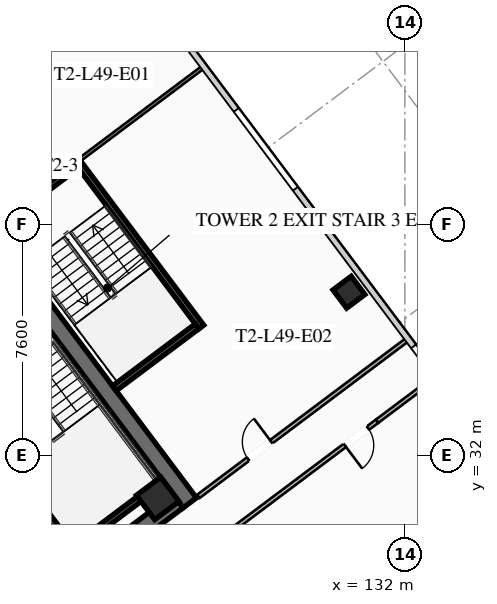
"""IFC4 building model, lengths in metres.
Left out: names, types, materials, properties, quantities, classifications, styles, units other than length and angle.
Written with IfcOpenShell. Run it as: python <this file> out.ifc"""

import sys

from ifc_helpers import new_model, si_unit, direction, frame, frame_2d, origin, origin_2d, place, context, subcontext, project, spatial, rectangle, hollow_rectangle, extrude, element, fill, save


model = new_model("IFC4")
c1 = context("Model", 3, precision=1e-05, world=origin(), true_north=direction((0.0, 1.0)))
c2 = subcontext(c1, "Body", "Model", "MODEL_VIEW")
j1 = project(units=[si_unit("LENGTHUNIT", "METRE"), si_unit("PLANEANGLEUNIT", "RADIAN")], contexts=[c1])
p1 = place(None, origin())
s1 = spatial("IfcSite", under=j1, at=p1, CompositionType="ELEMENT")
p2 = place(p1, origin())
s2 = spatial("IfcBuilding", under=s1, at=p2, CompositionType="ELEMENT")
p3 = place(p2, frame((0.0, 0.0, 181.85)))
s3 = spatial("IfcBuildingStorey", under=s2, at=p3, CompositionType="ELEMENT", Elevation=181.85)
p4 = place(p3, frame((115.564, 42.923, 0.0), z_axis=(0.0, 0.0, 1.0), x_axis=(0.600005007985, -0.799996243986, 0.0)))
e1 = element("IfcWall", 1, at=p4, inside=s3, PredefinedType="SHEAR", context=c2, shape_type="SweptSolid", body=[
    extrude(rectangle(XDim=15.6, YDim=0.55, at=frame_2d((7.8, 0.0))), origin(), (0.0, 0.0, 1.0), 3.55),
])
p5 = place(p3, frame((124.539, 30.498, 0.0), z_axis=(0.0, 0.0, 1.0), x_axis=(-0.799998054672, -0.600002593761, 0.0)))
e2 = element("IfcWall", 2, at=p5, inside=s3, PredefinedType="SHEAR", context=c2, shape_type="SweptSolid", body=[
    extrude(rectangle(XDim=15.06, YDim=0.55, at=frame_2d((7.53, 0.0))), origin(), (0.0, 0.0, 1.0), 3.55),
])
p6 = place(p5, frame((9.23, 0.0, 0.0)))
e3 = element("IfcOpeningElement", 3, at=p6, cuts=e2, PredefinedType="OPENING", context=c2, shape_type="SweptSolid", body=[
    extrude(rectangle(XDim=1.25, YDim=2.25, at=frame_2d((0.625, 1.125))), frame((0.0, 0.285, 0.0), z_axis=(0.0, -1.0, 0.0), x_axis=(1.0, 0.0, 0.0)), (0.0, 0.0, 1.0), 0.57),
])
p7 = place(p5, frame((4.18, 0.0, 0.0)))
e4 = element("IfcOpeningElement", 4, at=p7, cuts=e2, PredefinedType="OPENING", context=c2, shape_type="SweptSolid", body=[
    extrude(rectangle(XDim=1.25, YDim=2.25, at=frame_2d((0.625, 1.125))), frame((0.0, 0.285, 0.0), z_axis=(0.0, -1.0, 0.0), x_axis=(1.0, 0.0, 0.0)), (0.0, 0.0, 1.0), 0.57),
])
p8 = place(p3, frame((123.87, 30.59, 0.0), z_axis=(0.0, 0.0, 1.0), x_axis=(0.799999996291, 0.600000004945, 0.0)))
e5 = element("IfcColumn", 5, at=p8, inside=s3, PredefinedType="COLUMN", context=c2, shape_type="SweptSolid", body=[
    extrude(hollow_rectangle(XDim=1.0, YDim=1.0, WallThickness=0.04, at=origin_2d()), origin(), (0.0, 0.0, 1.0), 3.37),
])
p9 = place(p3, frame((130.16, 37.37, 0.0), z_axis=(0.0, 0.0, 1.0), x_axis=(0.799999996291, 0.600000004945, 0.0)))
e6 = element("IfcColumn", 6, at=p9, inside=s3, PredefinedType="COLUMN", context=c2, shape_type="SweptSolid", body=[
    extrude(hollow_rectangle(XDim=0.75, YDim=0.75, WallThickness=0.032, at=origin_2d()), origin(), (0.0, 0.0, 1.0), 3.37),
])
p10 = place(p3, frame((116.56, 34.92, 0.0), z_axis=(0.0, 0.0, 1.0), x_axis=(0.59999029481, -0.8000072788, 0.0)))
e7 = element("IfcWall", 7, at=p10, inside=s3, PredefinedType="SHEAR", context=c2, shape_type="SweptSolid", body=[
    extrude(rectangle(XDim=8.05, YDim=0.2, at=frame_2d((4.025, 0.0))), origin(), (0.0, 0.0, 1.0), 3.37),
])
p11 = place(p10, frame((0.45, 0.0, 0.0)))
e8 = element("IfcOpeningElement", 8, at=p11, cuts=e7, PredefinedType="OPENING", context=c2, shape_type="SweptSolid", body=[
    extrude(rectangle(XDim=1.15, YDim=2.2, at=frame_2d((0.575, 1.1))), frame((0.0, 0.11, 0.0), z_axis=(0.0, -1.0, 0.0), x_axis=(1.0, 0.0, 0.0)), (0.0, 0.0, 1.0), 0.22),
])
p12 = place(p3, frame((120.98, 28.86, 0.0), z_axis=(0.0, 0.0, 1.0), x_axis=(0.800015298837, 0.599979601008, 0.0)))
e9 = element("IfcWall", 9, at=p12, inside=s3, PredefinedType="SHEAR", context=c2, shape_type="SweptSolid", body=[
    extrude(rectangle(XDim=3.83, YDim=0.2, at=frame_2d((1.915, 0.0))), origin(), (0.0, 0.0, 1.0), 3.37),
])
p13 = place(p3, frame((125.304, 36.228, 0.0), z_axis=(0.0, 0.0, 1.0), x_axis=(-0.59998851072, 0.800008616831, 0.0)))
e10 = element("IfcWall", 10, at=p13, inside=s3, PredefinedType="SHEAR", context=c2, shape_type="SweptSolid", body=[
    extrude(rectangle(XDim=6.8, YDim=0.2, at=frame_2d((3.4, 0.0))), origin(), (0.0, 0.0, 1.0), 3.37),
])
p14 = place(p3, frame((121.204, 41.528, 0.0), z_axis=(0.0, 0.0, 1.0), x_axis=(-0.800017232136, -0.599977023131, 0.0)))
e11 = element("IfcWall", 11, at=p14, inside=s3, PredefinedType="SHEAR", context=c2, shape_type="SweptSolid", body=[
    extrude(rectangle(XDim=3.4, YDim=0.2, at=frame_2d((1.7, 0.0))), origin(), (0.0, 0.0, 1.0), 3.37),
])
p15 = place(p14, frame((1.975, 0.0, 0.0)))
e12 = element("IfcOpeningElement", 12, at=p15, cuts=e11, PredefinedType="OPENING", context=c2, shape_type="SweptSolid", body=[
    extrude(rectangle(XDim=1.15, YDim=2.2, at=frame_2d((0.575, 1.1))), frame((0.0, 0.11, 0.0), z_axis=(0.0, -1.0, 0.0), x_axis=(1.0, 0.0, 0.0)), (0.0, 0.0, 1.0), 0.22),
])
p16 = place(p3, frame((122.444, 34.208, 0.0), z_axis=(0.0, 0.0, 1.0), x_axis=(0.79999138319, 0.600011488909, 0.0)))
e13 = element("IfcWall", 13, at=p16, inside=s3, PredefinedType="SHEAR", context=c2, shape_type="SweptSolid", body=[
    extrude(rectangle(XDim=3.4, YDim=0.2, at=frame_2d((1.7, 0.0))), origin(), (0.0, 0.0, 1.0), 3.37),
])
p17 = place(p3, frame((131.09, 33.13, 0.0), z_axis=(0.0, 0.0, 1.0), x_axis=(-0.800003062365, -0.599995916825, 0.0)))
e14 = element("IfcWall", 14, at=p17, inside=s3, PredefinedType="PARTITIONING", context=c2, shape_type="SweptSolid", body=[
    extrude(rectangle(XDim=28.7, YDim=0.135, at=frame_2d((14.35, 0.0))), origin(), (0.0, 0.0, 1.0), 2.723),
])
p18 = place(p17, frame((27.37, 0.0, 0.0)))
e15 = element("IfcOpeningElement", 15, at=p18, cuts=e14, PredefinedType="OPENING", context=c2, shape_type="SweptSolid", body=[
    extrude(rectangle(XDim=0.95, YDim=2.05, at=frame_2d((0.475, 1.025))), frame((0.0, 0.077, 0.0), z_axis=(0.0, -1.0, 0.0), x_axis=(1.0, 0.0, 0.0)), (0.0, 0.0, 1.0), 0.155),
])
p19 = place(p17, frame((0.38, 0.0, 0.0)))
e16 = element("IfcOpeningElement", 16, at=p19, cuts=e14, PredefinedType="OPENING", context=c2, shape_type="SweptSolid", body=[
    extrude(rectangle(XDim=0.95, YDim=2.05, at=frame_2d((0.475, 1.025))), frame((0.0, 0.077, 0.0), z_axis=(0.0, -1.0, 0.0), x_axis=(1.0, 0.0, 0.0)), (0.0, 0.0, 1.0), 0.155),
])
p20 = place(p3, frame((131.09, 33.13, 0.0), z_axis=(0.0, 0.0, 1.0), x_axis=(0.799975885537, 0.600032151272, 0.0)))
e17 = element("IfcWall", 17, at=p20, inside=s3, PredefinedType="PARTITIONING", context=c2, shape_type="SweptSolid", body=[
    extrude(rectangle(XDim=2.43, YDim=0.135, at=frame_2d((1.215, 0.0))), origin(), (0.0, 0.0, 1.0), 2.723),
])
p21 = place(p3, frame((122.744, 48.308, 0.0), z_axis=(0.0, 0.0, 1.0), x_axis=(-0.79997892247, -0.600028102345, 0.0)))
e18 = element("IfcWall", 18, at=p21, inside=s3, PredefinedType="PARTITIONING", context=c2, shape_type="SweptSolid", body=[
    extrude(rectangle(XDim=6.95, YDim=0.135, at=frame_2d((3.475, 0.0))), origin(), (0.0, 0.0, 1.0), 2.723),
])
p22 = place(p21, frame((3.35, 0.0, 0.0)))
e19 = element("IfcOpeningElement", 19, at=p22, cuts=e18, PredefinedType="OPENING", context=c2, shape_type="SweptSolid", body=[
    extrude(rectangle(XDim=0.95, YDim=2.05, at=frame_2d((0.475, 1.025))), frame((0.0, 0.077, 0.0), z_axis=(0.0, -1.0, 0.0), x_axis=(1.0, 0.0, 0.0)), (0.0, 0.0, 1.0), 0.155),
])
p23 = place(p3, frame((125.208, 30.656, 0.0), z_axis=(0.0, 0.0, 1.0), x_axis=(0.800006797429, 0.599990936654, 0.0)))
e20 = element("IfcWall", 20, at=p23, inside=s3, PredefinedType="PARTITIONING", context=c2, shape_type="SweptSolid", body=[
    extrude(rectangle(XDim=8.62, YDim=0.135, at=frame_2d((4.31, 0.0))), origin(), (0.0, 0.0, 1.0), 2.723),
])
p24 = place(p23, frame((2.045, 0.0, 0.0)))
e21 = element("IfcOpeningElement", 21, at=p24, cuts=e20, PredefinedType="OPENING", context=c2, shape_type="SweptSolid", body=[
    extrude(rectangle(XDim=0.95, YDim=2.05, at=frame_2d((0.475, 1.025))), frame((0.0, 0.077, 0.0), z_axis=(0.0, -1.0, 0.0), x_axis=(1.0, 0.0, 0.0)), (0.0, 0.0, 1.0), 0.155),
])
p25 = place(p3, frame((125.384, 44.788, 0.0), z_axis=(0.0, 0.0, 1.0), x_axis=(-0.8, -0.6, 0.0)))
e22 = element("IfcWall", 22, at=p25, inside=s3, PredefinedType="PARTITIONING", context=c2, shape_type="SweptSolid", body=[
    extrude(rectangle(XDim=5.1, YDim=0.11, at=frame_2d((2.55, 0.0))), origin(), (0.0, 0.0, 1.0), 2.723),
])
p26 = place(p19, origin())
e23 = element("IfcDoor", 23, at=p26, inside=s3, OperationType="SINGLE_SWING_RIGHT", PredefinedType="DOOR", context=c2, shape_type="SweptSolid", body=[
    extrude(rectangle(XDim=0.95, YDim=2.05, at=frame_2d((0.475, 1.025))), frame((0.0, 0.025, 0.0), z_axis=(0.0, -1.0, 0.0), x_axis=(1.0, 0.0, 0.0)), (0.0, 0.0, 1.0), 0.05),
])
fill(e16, e23)
p27 = place(p24, origin())
e24 = element("IfcDoor", 24, at=p27, inside=s3, OperationType="SINGLE_SWING_RIGHT", PredefinedType="DOOR", context=c2, shape_type="SweptSolid", body=[
    extrude(rectangle(XDim=0.95, YDim=2.05, at=frame_2d((0.475, 1.025))), frame((0.0, 0.025, 0.0), z_axis=(0.0, -1.0, 0.0), x_axis=(1.0, 0.0, 0.0)), (0.0, 0.0, 1.0), 0.05),
])
fill(e21, e24)
save(model, sys.argv[1])
